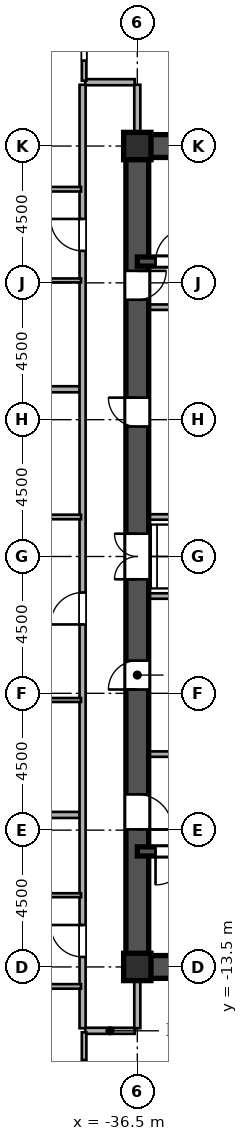
"""IFC4 building model, lengths in metres.
Left out: names, types, materials, properties, quantities, classifications, styles, units other than length and angle.
Written with IfcOpenShell. Run it as: python <this file> out.ifc"""

import sys

from ifc_helpers import new_model, si_unit, direction, frame, frame_2d, origin, origin_2d, place, context, subcontext, project, spatial, rectangle, i_section, extrude, source, transform, mapped, element, fill, save


model = new_model("IFC4")
c1 = context("Model", 3, precision=1e-05, world=origin(), true_north=direction((0.0, 1.0)))
c2 = subcontext(c1, "Body", "Model", "MODEL_VIEW")
j1 = project(units=[si_unit("LENGTHUNIT", "METRE"), si_unit("PLANEANGLEUNIT", "RADIAN")], contexts=[c1])
p1 = place(None, origin())
s1 = spatial("IfcSite", under=j1, at=p1, CompositionType="ELEMENT")
p2 = place(p1, origin())
s2 = spatial("IfcBuilding", under=s1, at=p2, CompositionType="ELEMENT")
p3 = place(p2, frame((0.0, 0.0, 44.1)))
s3 = spatial("IfcBuildingStorey", under=s2, at=p3, CompositionType="ELEMENT", Elevation=44.1)
m1 = source(origin(), c2, "Body", "SweptSolid", [
    extrude(i_section(OverallWidth=0.9, OverallDepth=0.9, WebThickness=0.036, FlangeThickness=0.055, at=origin_2d()), origin(), (0.0, 0.0, 1.0), 3.6),
])
for number, where, z_axis, x_axis in (
    (1, (-36.5, -13.5, 0.0), (0.0, 0.0, 1.0), (1.0, 0.0, 0.0)),
    (2, (-36.5, 13.5, 0.0), (0.0, 0.0, 1.0), (1.0, 0.0, 0.0)),
):
    element("IfcColumn", number, at=place(p3, frame(where, z_axis=z_axis, x_axis=x_axis)), inside=s3, PredefinedType="COLUMN", context=c2, shape_type="MappedRepresentation", body=[
        mapped(m1, transform((0.0, 0.0, 0.0), scale=1.0)),
    ])
for number, where, z_axis, x_axis in (
    (3, (-36.5, -13.5, 0.0), (0.0, 0.0, 1.0), (1.0, 0.0, 0.0)),
    (4, (-36.5, 13.5, 0.0), (0.0, 0.0, 1.0), (1.0, 0.0, 0.0)),
):
    element("IfcWall", number, at=place(p3, frame(where, z_axis=z_axis, x_axis=x_axis)), inside=s3, PredefinedType="SHEAR", context=c2, shape_type="SweptSolid", body=[
        extrude(rectangle(XDim=9.0, YDim=0.75, at=frame_2d((4.5, 0.0))), origin(), (0.0, 0.0, 1.0), 3.38),
    ])
p4 = place(p3, frame((-36.5, -13.65, 0.0), z_axis=(0.0, 0.0, 1.0), x_axis=(0.0, 1.0, 0.0)))
e5 = element("IfcWall", 5, at=p4, inside=s3, PredefinedType="SHEAR", context=c2, shape_type="SweptSolid", body=[
    extrude(rectangle(XDim=7.15, YDim=0.75, at=frame_2d((3.575, 0.0))), origin(), (0.0, 0.0, 1.0), 3.38),
])
p5 = place(p4, frame((4.675, 0.0, 0.0)))
e6 = element("IfcOpeningElement", 6, at=p5, cuts=e5, PredefinedType="OPENING", context=c2, shape_type="SweptSolid", body=[
    extrude(rectangle(XDim=1.15, YDim=2.2, at=frame_2d((0.575, 1.1))), frame((0.0, 0.385, 0.0), z_axis=(0.0, -1.0, 0.0), x_axis=(1.0, 0.0, 0.0)), (0.0, 0.0, 1.0), 0.77),
])
p6 = place(p3, frame((-36.5, -1.3, 0.0), z_axis=(0.0, 0.0, 1.0), x_axis=(0.0, 1.0, 0.0)))
e7 = element("IfcWall", 7, at=p6, inside=s3, PredefinedType="SHEAR", context=c2, shape_type="SweptSolid", body=[
    extrude(rectangle(XDim=2.6, YDim=0.75, at=frame_2d((1.3, 0.0))), origin(), (0.0, 0.0, 1.0), 3.38),
])
p7 = place(p6, frame((0.55, 0.0, 0.0)))
e8 = element("IfcOpeningElement", 8, at=p7, cuts=e7, PredefinedType="OPENING", context=c2, shape_type="SweptSolid", body=[
    extrude(rectangle(XDim=1.5, YDim=2.3, at=frame_2d((0.75, 1.15))), frame((0.0, 0.385, 0.0), z_axis=(0.0, -1.0, 0.0), x_axis=(1.0, 0.0, 0.0)), (0.0, 0.0, 1.0), 0.77),
])
p8 = place(p3, frame((-36.5, 8.2, 0.0), z_axis=(0.0, 0.0, 1.0), x_axis=(0.0, 1.0, 0.0)))
e9 = element("IfcWall", 9, at=p8, inside=s3, PredefinedType="SHEAR", context=c2, shape_type="SweptSolid", body=[
    extrude(rectangle(XDim=5.45, YDim=0.75, at=frame_2d((2.725, 0.0))), origin(), (0.0, 0.0, 1.0), 3.38),
])
p9 = place(p8, frame((0.245, 0.0, 0.0)))
e10 = element("IfcOpeningElement", 10, at=p9, cuts=e9, PredefinedType="OPENING", context=c2, shape_type="SweptSolid", body=[
    extrude(rectangle(XDim=0.95, YDim=2.15, at=frame_2d((0.475, 1.075))), frame((0.0, 0.385, 0.0), z_axis=(0.0, -1.0, 0.0), x_axis=(1.0, 0.0, 0.0)), (0.0, 0.0, 1.0), 0.77),
])
p10 = place(p3, frame((-36.5, -6.5, 0.0), z_axis=(0.0, 0.0, 1.0), x_axis=(0.0, 1.0, 0.0)))
e11 = element("IfcWall", 11, at=p10, inside=s3, PredefinedType="SHEAR", context=c2, shape_type="SweptSolid", body=[
    extrude(rectangle(XDim=5.2, YDim=0.75, at=frame_2d((2.6, 0.0))), origin(), (0.0, 0.0, 1.0), 3.38),
])
p11 = place(p10, frame((2.125, 0.0, 0.0)))
e12 = element("IfcOpeningElement", 12, at=p11, cuts=e11, PredefinedType="OPENING", context=c2, shape_type="SweptSolid", body=[
    extrude(rectangle(XDim=0.95, YDim=2.15, at=frame_2d((0.475, 1.075))), frame((0.0, 0.385, 0.0), z_axis=(0.0, -1.0, 0.0), x_axis=(1.0, 0.0, 0.0)), (0.0, 0.0, 1.0), 0.77),
])
p12 = place(p3, frame((-36.5, 1.3, 0.0), z_axis=(0.0, 0.0, 1.0), x_axis=(0.0, 1.0, 0.0)))
e13 = element("IfcWall", 13, at=p12, inside=s3, PredefinedType="SHEAR", context=c2, shape_type="SweptSolid", body=[
    extrude(rectangle(XDim=6.9, YDim=0.75, at=frame_2d((3.45, 0.0))), origin(), (0.0, 0.0, 1.0), 3.38),
])
p13 = place(p12, frame((2.975, 0.0, 0.0)))
e14 = element("IfcOpeningElement", 14, at=p13, cuts=e13, PredefinedType="OPENING", context=c2, shape_type="SweptSolid", body=[
    extrude(rectangle(XDim=0.95, YDim=2.15, at=frame_2d((0.475, 1.075))), frame((0.0, 0.385, 0.0), z_axis=(0.0, -1.0, 0.0), x_axis=(1.0, 0.0, 0.0)), (0.0, 0.0, 1.0), 0.77),
])
p14 = place(p3, frame((-36.5, -9.7, 0.0), z_axis=(0.0, 0.0, 1.0), x_axis=(1.0, 0.0, 0.0)))
e15 = element("IfcWall", 15, at=p14, inside=s3, PredefinedType="SHEAR", context=c2, shape_type="SweptSolid", body=[
    extrude(rectangle(XDim=9.0, YDim=0.3, at=frame_2d((4.5, 0.0))), origin(), (0.0, 0.0, 1.0), 3.38),
])
p15 = place(p14, frame((0.6, 0.0, 0.0)))
e16 = element("IfcOpeningElement", 16, at=p15, cuts=e15, PredefinedType="OPENING", context=c2, shape_type="SweptSolid", body=[
    extrude(rectangle(XDim=1.1, YDim=2.2, at=frame_2d((0.55, 1.1))), frame((0.0, 0.16, 0.0), z_axis=(0.0, -1.0, 0.0), x_axis=(1.0, 0.0, 0.0)), (0.0, 0.0, 1.0), 0.32),
])
p16 = place(p3, frame((-36.5, 9.7, 0.0), z_axis=(0.0, 0.0, 1.0), x_axis=(1.0, 0.0, 0.0)))
e17 = element("IfcWall", 17, at=p16, inside=s3, PredefinedType="SHEAR", context=c2, shape_type="SweptSolid", body=[
    extrude(rectangle(XDim=9.0, YDim=0.3, at=frame_2d((4.5, 0.0))), origin(), (0.0, 0.0, 1.0), 3.38),
])
p17 = place(p16, frame((0.6, 0.0, 0.0)))
e18 = element("IfcOpeningElement", 18, at=p17, cuts=e17, PredefinedType="OPENING", context=c2, shape_type="SweptSolid", body=[
    extrude(rectangle(XDim=1.1, YDim=2.2, at=frame_2d((0.55, 1.1))), frame((0.0, 0.16, 0.0), z_axis=(0.0, -1.0, 0.0), x_axis=(1.0, 0.0, 0.0)), (0.0, 0.0, 1.0), 0.32),
])
for number, where, z_axis, x_axis in (
    (19, (-36.15, -6.5, 0.0), (0.0, 0.0, 1.0), (1.0, 0.0, 0.0)),
    (20, (-36.15, 8.2, 0.0), (0.0, 0.0, 1.0), (1.0, 0.0, 0.0)),
):
    element("IfcWall", number, at=place(p3, frame(where, z_axis=z_axis, x_axis=x_axis)), inside=s3, PredefinedType="PARTITIONING", context=c2, shape_type="SweptSolid", body=[
        extrude(rectangle(XDim=5.7, YDim=0.18, at=frame_2d((2.85, 0.0))), origin(), (0.0, 0.0, 1.0), 3.38),
    ])
for number, where, z_axis, x_axis in (
    (21, (-36.15, -1.3, 0.0), (0.0, 0.0, 1.0), (1.0, 0.0, 0.0)),
    (22, (-36.15, 1.3, 0.0), (0.0, 0.0, 1.0), (1.0, 0.0, 0.0)),
):
    element("IfcWall", number, at=place(p3, frame(where, z_axis=z_axis, x_axis=x_axis)), inside=s3, PredefinedType="PARTITIONING", context=c2, shape_type="SweptSolid", body=[
        extrude(rectangle(XDim=2.95, YDim=0.18, at=frame_2d((1.475, 0.0))), origin(), (0.0, 0.0, 1.0), 3.38),
    ])
p18 = place(p3, frame((-38.215, -15.6, 0.0), z_axis=(0.0, 0.0, 1.0), x_axis=(1.0, 0.0, 0.0)))
e23 = element("IfcWall", 23, at=p18, inside=s3, PredefinedType="PARTITIONING", context=c2, shape_type="SweptSolid", body=[
    extrude(rectangle(XDim=1.63, YDim=0.2, at=frame_2d((0.815, 0.0))), origin(), (0.0, 0.0, 1.0), 3.38),
])
p19 = place(p3, frame((-44.45, -14.14, 0.0), z_axis=(0.0, 0.0, 1.0), x_axis=(1.0, 0.0, 0.0)))
e24 = element("IfcWall", 24, at=p19, inside=s3, PredefinedType="PARTITIONING", context=c2, shape_type="SweptSolid", body=[
    extrude(rectangle(XDim=6.1, YDim=0.15, at=frame_2d((3.05, 0.0))), origin(), (0.0, 0.0, 1.0), 3.38),
])
p20 = place(p19, frame((2.575, 0.0, 0.0)))
e25 = element("IfcOpeningElement", 25, at=p20, cuts=e24, PredefinedType="OPENING", context=c2, shape_type="SweptSolid", body=[
    extrude(rectangle(XDim=0.95, YDim=2.15, at=frame_2d((0.475, 1.075))), frame((0.0, 0.085, 0.0), z_axis=(0.0, -1.0, 0.0), x_axis=(1.0, 0.0, 0.0)), (0.0, 0.0, 1.0), 0.17),
])
p21 = place(p3, frame((-44.45, -11.14, 0.0), z_axis=(0.0, 0.0, 1.0), x_axis=(1.0, 0.0, 0.0)))
e26 = element("IfcWall", 26, at=p21, inside=s3, PredefinedType="PARTITIONING", context=c2, shape_type="SweptSolid", body=[
    extrude(rectangle(XDim=6.1, YDim=0.13, at=frame_2d((3.05, 0.0))), origin(), (0.0, 0.0, 1.0), 3.38),
])
p22 = place(p21, frame((2.61, 0.0, 0.0)))
e27 = element("IfcOpeningElement", 27, at=p22, cuts=e26, PredefinedType="OPENING", context=c2, shape_type="SweptSolid", body=[
    extrude(rectangle(XDim=0.88, YDim=2.1, at=frame_2d((0.44, 1.05))), frame((0.0, 0.075, 0.0), z_axis=(0.0, -1.0, 0.0), x_axis=(1.0, 0.0, 0.0)), (0.0, 0.0, 1.0), 0.15),
])
p23 = place(p3, frame((-72.505, -8.5, 0.0), z_axis=(0.0, 0.0, 1.0), x_axis=(1.0, 0.0, 0.0)))
e28 = element("IfcWall", 28, at=p23, inside=s3, PredefinedType="PARTITIONING", context=c2, shape_type="SweptSolid", body=[
    extrude(rectangle(XDim=34.125, YDim=0.2, at=frame_2d((17.062, 0.0))), origin(), (0.0, 0.0, 1.0), 3.38),
])
p24 = place(p3, frame((-44.45, -4.72, 0.0), z_axis=(0.0, 0.0, 1.0), x_axis=(1.0, 0.0, 0.0)))
e29 = element("IfcWall", 29, at=p24, inside=s3, PredefinedType="PARTITIONING", context=c2, shape_type="SweptSolid", body=[
    extrude(rectangle(XDim=6.1, YDim=0.13, at=frame_2d((3.05, 0.0))), origin(), (0.0, 0.0, 1.0), 3.38),
])
p25 = place(p24, frame((2.61, 0.0, 0.0)))
e30 = element("IfcOpeningElement", 30, at=p25, cuts=e29, PredefinedType="OPENING", context=c2, shape_type="SweptSolid", body=[
    extrude(rectangle(XDim=0.88, YDim=2.1, at=frame_2d((0.44, 1.05))), frame((0.0, 0.075, 0.0), z_axis=(0.0, -1.0, 0.0), x_axis=(1.0, 0.0, 0.0)), (0.0, 0.0, 1.0), 0.15),
])
p26 = place(p3, frame((-44.45, 1.3, 0.0), z_axis=(0.0, 0.0, 1.0), x_axis=(1.0, 0.0, 0.0)))
e31 = element("IfcWall", 31, at=p26, inside=s3, PredefinedType="PARTITIONING", context=c2, shape_type="SweptSolid", body=[
    extrude(rectangle(XDim=6.1, YDim=0.15, at=frame_2d((3.05, 0.0))), origin(), (0.0, 0.0, 1.0), 3.38),
])
p27 = place(p26, frame((2.575, 0.0, 0.0)))
e32 = element("IfcOpeningElement", 32, at=p27, cuts=e31, PredefinedType="OPENING", context=c2, shape_type="SweptSolid", body=[
    extrude(rectangle(XDim=0.95, YDim=2.15, at=frame_2d((0.475, 1.075))), frame((0.0, 0.085, 0.0), z_axis=(0.0, -1.0, 0.0), x_axis=(1.0, 0.0, 0.0)), (0.0, 0.0, 1.0), 0.17),
])
p28 = place(p3, frame((-72.505, 5.5, 0.0), z_axis=(0.0, 0.0, 1.0), x_axis=(1.0, 0.0, 0.0)))
e33 = element("IfcWall", 33, at=p28, inside=s3, PredefinedType="PARTITIONING", context=c2, shape_type="SweptSolid", body=[
    extrude(rectangle(XDim=34.125, YDim=0.2, at=frame_2d((17.062, 0.0))), origin(), (0.0, 0.0, 1.0), 3.38),
])
p29 = place(p3, frame((-44.45, 9.08, 0.0), z_axis=(0.0, 0.0, 1.0), x_axis=(1.0, 0.0, 0.0)))
e34 = element("IfcWall", 34, at=p29, inside=s3, PredefinedType="PARTITIONING", context=c2, shape_type="SweptSolid", body=[
    extrude(rectangle(XDim=6.1, YDim=0.13, at=frame_2d((3.05, 0.0))), origin(), (0.0, 0.0, 1.0), 3.38),
])
p30 = place(p29, frame((2.61, 0.0, 0.0)))
e35 = element("IfcOpeningElement", 35, at=p30, cuts=e34, PredefinedType="OPENING", context=c2, shape_type="SweptSolid", body=[
    extrude(rectangle(XDim=0.88, YDim=2.1, at=frame_2d((0.44, 1.05))), frame((0.0, 0.075, 0.0), z_axis=(0.0, -1.0, 0.0), x_axis=(1.0, 0.0, 0.0)), (0.0, 0.0, 1.0), 0.15),
])
p31 = place(p3, frame((-44.45, 12.08, 0.0), z_axis=(0.0, 0.0, 1.0), x_axis=(1.0, 0.0, 0.0)))
e36 = element("IfcWall", 36, at=p31, inside=s3, PredefinedType="PARTITIONING", context=c2, shape_type="SweptSolid", body=[
    extrude(rectangle(XDim=6.1, YDim=0.15, at=frame_2d((3.05, 0.0))), origin(), (0.0, 0.0, 1.0), 3.38),
])
p32 = place(p31, frame((2.575, 0.0, 0.0)))
e37 = element("IfcOpeningElement", 37, at=p32, cuts=e36, PredefinedType="OPENING", context=c2, shape_type="SweptSolid", body=[
    extrude(rectangle(XDim=0.95, YDim=2.15, at=frame_2d((0.475, 1.075))), frame((0.0, 0.085, 0.0), z_axis=(0.0, -1.0, 0.0), x_axis=(1.0, 0.0, 0.0)), (0.0, 0.0, 1.0), 0.17),
])
p33 = place(p3, frame((-38.215, 15.6, 0.0), z_axis=(0.0, 0.0, 1.0), x_axis=(1.0, 0.0, 0.0)))
e38 = element("IfcWall", 38, at=p33, inside=s3, PredefinedType="PARTITIONING", context=c2, shape_type="SweptSolid", body=[
    extrude(rectangle(XDim=1.63, YDim=0.2, at=frame_2d((0.815, 0.0))), origin(), (0.0, 0.0, 1.0), 3.38),
])
p34 = place(p3, frame((-38.3, -15.515, 0.0), z_axis=(0.0, 0.0, 1.0), x_axis=(0.0, 1.0, 0.0)))
e39 = element("IfcWall", 39, at=p34, inside=s3, PredefinedType="PARTITIONING", context=c2, shape_type="SweptSolid", body=[
    extrude(rectangle(XDim=31.03, YDim=0.2, at=frame_2d((15.515, 0.0))), origin(), (0.0, 0.0, 1.0), 3.38),
])
p35 = place(p34, frame((2.345, 0.0, 0.0)))
e40 = element("IfcOpeningElement", 40, at=p35, cuts=e39, PredefinedType="OPENING", context=c2, shape_type="SweptSolid", body=[
    extrude(rectangle(XDim=1.05, YDim=2.25, at=frame_2d((0.525, 1.125))), frame((0.0, 0.11, 0.0), z_axis=(0.0, -1.0, 0.0), x_axis=(1.0, 0.0, 0.0)), (0.0, 0.0, 1.0), 0.22),
])
p36 = place(p34, frame((13.28, 0.0, 0.0)))
e41 = element("IfcOpeningElement", 41, at=p36, cuts=e39, PredefinedType="OPENING", context=c2, shape_type="SweptSolid", body=[
    extrude(rectangle(XDim=1.05, YDim=2.25, at=frame_2d((0.525, 1.125))), frame((0.0, 0.11, 0.0), z_axis=(0.0, -1.0, 0.0), x_axis=(1.0, 0.0, 0.0)), (0.0, 0.0, 1.0), 0.22),
])
p37 = place(p34, frame((25.567, 0.0, 0.0)))
e42 = element("IfcOpeningElement", 42, at=p37, cuts=e39, PredefinedType="OPENING", context=c2, shape_type="SweptSolid", body=[
    extrude(rectangle(XDim=1.05, YDim=2.25, at=frame_2d((0.525, 1.125))), frame((0.0, 0.11, 0.0), z_axis=(0.0, -1.0, 0.0), x_axis=(1.0, 0.0, 0.0)), (0.0, 0.0, 1.0), 0.22),
])
p38 = place(p3, frame((-38.25, -23.898, 0.0), z_axis=(0.0, 0.0, 1.0), x_axis=(0.0, 1.0, 0.0)))
e43 = element("IfcWall", 43, at=p38, inside=s3, PredefinedType="PARTITIONING", context=c2, shape_type="SweptSolid", body=[
    extrude(rectangle(XDim=8.248, YDim=0.15, at=frame_2d((4.124, 0.0))), origin(), (0.0, 0.0, 1.0), 3.38),
])
p39 = place(p38, frame((6.391, 0.0, 0.0)))
e44 = element("IfcOpeningElement", 44, at=p39, cuts=e43, PredefinedType="OPENING", context=c2, shape_type="SweptSolid", body=[
    extrude(rectangle(XDim=0.95, YDim=2.15, at=frame_2d((0.475, 1.075))), frame((0.0, 0.085, 0.0), z_axis=(0.0, -1.0, 0.0), x_axis=(1.0, 0.0, 0.0)), (0.0, 0.0, 1.0), 0.17),
])
p40 = place(p3, frame((-38.25, 15.65, 0.0), z_axis=(0.0, 0.0, 1.0), x_axis=(0.0, 1.0, 0.0)))
e45 = element("IfcWall", 45, at=p40, inside=s3, PredefinedType="PARTITIONING", context=c2, shape_type="SweptSolid", body=[
    extrude(rectangle(XDim=8.248, YDim=0.15, at=frame_2d((4.124, 0.0))), origin(), (0.0, 0.0, 1.0), 3.38),
])
p41 = place(p40, frame((0.66, 0.0, 0.0)))
e46 = element("IfcOpeningElement", 46, at=p41, cuts=e45, PredefinedType="OPENING", context=c2, shape_type="SweptSolid", body=[
    extrude(rectangle(XDim=0.95, YDim=2.15, at=frame_2d((0.475, 1.075))), frame((0.0, 0.085, 0.0), z_axis=(0.0, -1.0, 0.0), x_axis=(1.0, 0.0, 0.0)), (0.0, 0.0, 1.0), 0.17),
])
p42 = place(p40, frame((2.985, 0.0, 0.0)))
e47 = element("IfcOpeningElement", 47, at=p42, cuts=e45, PredefinedType="OPENING", context=c2, shape_type="SweptSolid", body=[
    extrude(rectangle(XDim=0.95, YDim=2.15, at=frame_2d((0.475, 1.075))), frame((0.0, 0.085, 0.0), z_axis=(0.0, -1.0, 0.0), x_axis=(1.0, 0.0, 0.0)), (0.0, 0.0, 1.0), 0.17),
])
for number, where, z_axis, x_axis in (
    (48, (-36.5, -15.515, 0.0), (0.0, 0.0, 1.0), (0.0, 1.0, 0.0)),
    (49, (-36.5, 13.88, 0.0), (0.0, 0.0, 1.0), (0.0, 1.0, 0.0)),
):
    element("IfcWall", number, at=place(p3, frame(where, z_axis=z_axis, x_axis=x_axis)), inside=s3, PredefinedType="PARTITIONING", context=c2, shape_type="SweptSolid", body=[
        extrude(rectangle(XDim=1.635, YDim=0.2, at=frame_2d((0.817, 0.0))), origin(), (0.0, 0.0, 1.0), 2.68),
    ])
m2 = source(origin(), c2, "Body", "SweptSolid", [
    extrude(rectangle(XDim=1.15, YDim=2.2, at=frame_2d((0.575, 1.1))), frame((0.0, 0.025, 0.0), z_axis=(0.0, -1.0, 0.0), x_axis=(1.0, 0.0, 0.0)), (0.0, 0.0, 1.0), 0.05),
])
p43 = place(p5, frame((1.15, 0.0, 0.0), z_axis=(0.0, 0.0, 1.0), x_axis=(-1.0, 0.0, 0.0)))
e50 = element("IfcDoor", 50, at=p43, inside=s3, OperationType="SINGLE_SWING_LEFT", PredefinedType="DOOR", context=c2, shape_type="MappedRepresentation", body=[
    mapped(m2, transform((0.0, 0.0, 0.0), scale=1.0)),
])
fill(e6, e50)
m3 = source(origin(), c2, "Body", "SweptSolid", [
    extrude(rectangle(XDim=1.5, YDim=2.3, at=frame_2d((0.75, 1.15))), frame((0.0, 0.025, 0.0), z_axis=(0.0, -1.0, 0.0), x_axis=(1.0, 0.0, 0.0)), (0.0, 0.0, 1.0), 0.05),
])
p44 = place(p7, origin())
e51 = element("IfcDoor", 51, at=p44, inside=s3, OperationType="DOUBLE_SWING_LEFT", PredefinedType="DOOR", context=c2, shape_type="MappedRepresentation", body=[
    mapped(m3, transform((0.0, 0.0, 0.0), scale=1.0)),
])
fill(e8, e51)
m4 = source(origin(), c2, "Body", "SweptSolid", [
    extrude(rectangle(XDim=0.95, YDim=2.15, at=frame_2d((0.475, 1.075))), frame((0.0, 0.025, 0.0), z_axis=(0.0, -1.0, 0.0), x_axis=(1.0, 0.0, 0.0)), (0.0, 0.0, 1.0), 0.05),
])
p45 = place(p9, frame((0.95, 0.0, 0.0), z_axis=(0.0, 0.0, 1.0), x_axis=(-1.0, 0.0, 0.0)))
e52 = element("IfcDoor", 52, at=p45, inside=s3, OperationType="SINGLE_SWING_RIGHT", PredefinedType="DOOR", context=c2, shape_type="MappedRepresentation", body=[
    mapped(m4, transform((0.0, 0.0, 0.0), scale=1.0)),
])
fill(e10, e52)
p46 = place(p11, origin())
e53 = element("IfcDoor", 53, at=p46, inside=s3, OperationType="SINGLE_SWING_LEFT", PredefinedType="DOOR", context=c2, shape_type="MappedRepresentation", body=[
    mapped(m4, transform((0.0, 0.0, 0.0), scale=1.0)),
])
fill(e12, e53)
p47 = place(p13, origin())
e54 = element("IfcDoor", 54, at=p47, inside=s3, OperationType="SINGLE_SWING_RIGHT", PredefinedType="DOOR", context=c2, shape_type="MappedRepresentation", body=[
    mapped(m4, transform((0.0, 0.0, 0.0), scale=1.0)),
])
fill(e14, e54)
m5 = source(origin(), c2, "Body", "SweptSolid", [
    extrude(rectangle(XDim=1.1, YDim=2.2, at=frame_2d((0.55, 1.1))), frame((0.0, 0.025, 0.0), z_axis=(0.0, -1.0, 0.0), x_axis=(1.0, 0.0, 0.0)), (0.0, 0.0, 1.0), 0.05),
])
p48 = place(p15, frame((1.1, 0.0, 0.0), z_axis=(0.0, 0.0, 1.0), x_axis=(-1.0, 0.0, 0.0)))
e55 = element("IfcDoor", 55, at=p48, inside=s3, OperationType="SINGLE_SWING_LEFT", PredefinedType="DOOR", context=c2, shape_type="MappedRepresentation", body=[
    mapped(m5, transform((0.0, 0.0, 0.0), scale=1.0)),
])
fill(e16, e55)
p49 = place(p17, origin())
e56 = element("IfcDoor", 56, at=p49, inside=s3, OperationType="SINGLE_SWING_RIGHT", PredefinedType="DOOR", context=c2, shape_type="MappedRepresentation", body=[
    mapped(m5, transform((0.0, 0.0, 0.0), scale=1.0)),
])
fill(e18, e56)
m6 = source(origin(), c2, "Body", "SweptSolid", [
    extrude(rectangle(XDim=1.05, YDim=2.25, at=frame_2d((0.525, 1.125))), frame((0.0, 0.025, 0.0), z_axis=(0.0, -1.0, 0.0), x_axis=(1.0, 0.0, 0.0)), (0.0, 0.0, 1.0), 0.05),
])
p50 = place(p35, origin())
e57 = element("IfcDoor", 57, at=p50, inside=s3, OperationType="SINGLE_SWING_RIGHT", PredefinedType="DOOR", context=c2, shape_type="MappedRepresentation", body=[
    mapped(m6, transform((0.0, 0.0, 0.0), scale=1.0)),
])
fill(e40, e57)
p51 = place(p36, origin())
e58 = element("IfcDoor", 58, at=p51, inside=s3, OperationType="SINGLE_SWING_LEFT", PredefinedType="DOOR", context=c2, shape_type="MappedRepresentation", body=[
    mapped(m6, transform((0.0, 0.0, 0.0), scale=1.0)),
])
fill(e41, e58)
p52 = place(p37, origin())
e59 = element("IfcDoor", 59, at=p52, inside=s3, OperationType="SINGLE_SWING_RIGHT", PredefinedType="DOOR", context=c2, shape_type="MappedRepresentation", body=[
    mapped(m6, transform((0.0, 0.0, 0.0), scale=1.0)),
])
fill(e42, e59)
save(model, sys.argv[1])
